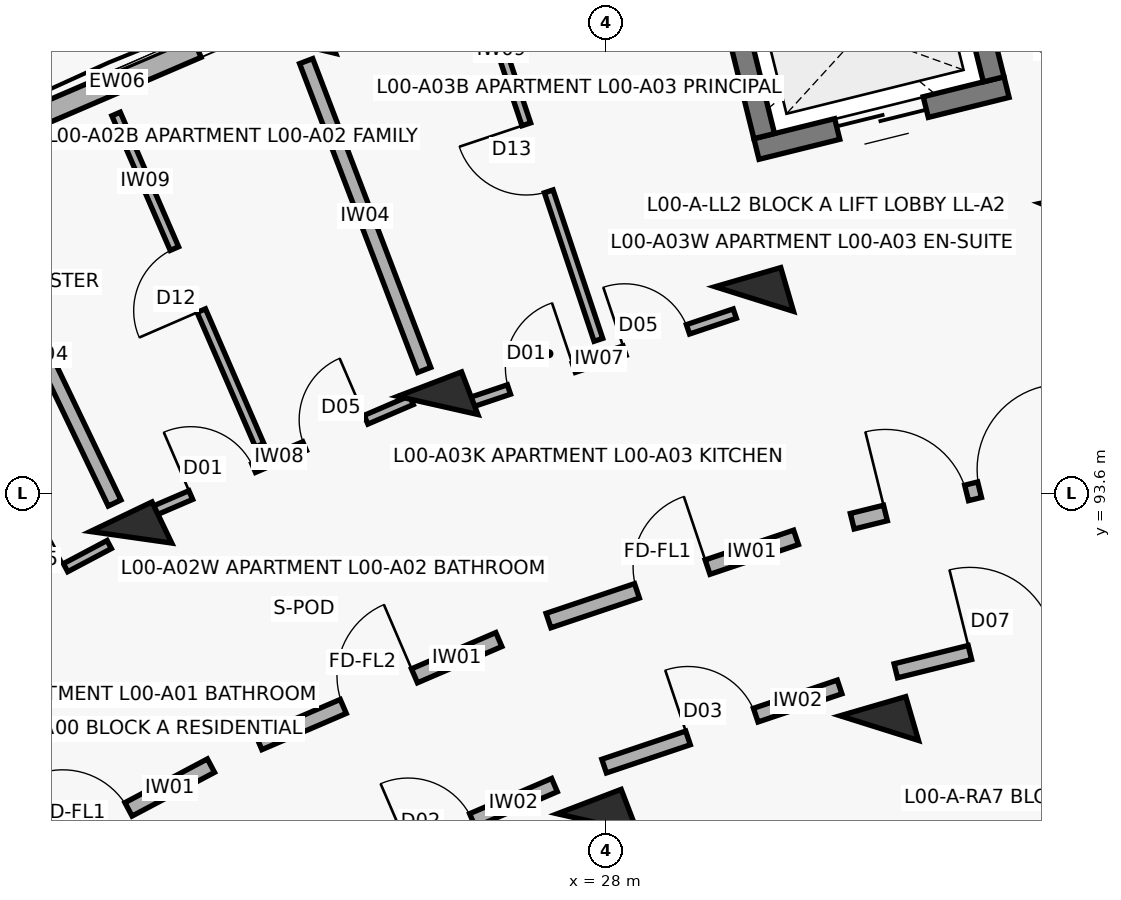
"""IFC4 building model, lengths in metres.
Left out: names, types, materials, properties, quantities, classifications, styles, units other than length and angle.
Written with IfcOpenShell. Run it as: python <this file> out.ifc"""

import sys

from ifc_helpers import new_model, si_unit, direction, frame, frame_2d, origin, origin_2d, place, context, subcontext, project, spatial, rectangle, extrude, element, fill, save


model = new_model("IFC4")
c1 = context("Model", 3, precision=1e-05, world=origin(), true_north=direction((0.0, 1.0)))
c2 = subcontext(c1, "Body", "Model", "MODEL_VIEW")
j1 = project(units=[si_unit("LENGTHUNIT", "METRE"), si_unit("PLANEANGLEUNIT", "RADIAN")], contexts=[c1])
p1 = place(None, origin())
s1 = spatial("IfcSite", under=j1, at=p1, CompositionType="ELEMENT")
p2 = place(p1, origin())
s2 = spatial("IfcBuilding", under=s1, at=p2, CompositionType="ELEMENT")
p3 = place(p2, origin())
s3 = spatial("IfcBuildingStorey", under=s2, at=p3, CompositionType="ELEMENT", Elevation=0.0)
for number, where, z_axis, x_axis in (
    (1, (21.754, 93.019, 0.0), (0.0, 0.0, 1.0), (-0.432, 0.902, 0.0)),
    (2, (27.889, 89.261, 0.0), (0.0, 0.0, 1.0), (-0.357, 0.934, 0.0)),
    (3, (25.79, 94.753, 0.0), (0.0, 0.0, 1.0), (-0.357, 0.934, 0.0)),
):
    element("IfcColumn", number, at=place(p3, frame(where, z_axis=z_axis, x_axis=x_axis)), inside=s3, PredefinedType="COLUMN", context=c2, shape_type="SweptSolid", body=[
        extrude(rectangle(XDim=0.6, YDim=0.9, at=origin_2d()), origin(), (0.0, 0.0, 1.0), 4.5),
    ])
p4 = place(p3, frame((23.976, 99.499, 0.0), z_axis=(0.0, 0.0, 1.0), x_axis=(-0.357064076459, 0.934079892355, 0.0)))
e4 = element("IfcColumn", 4, at=p4, inside=s3, PredefinedType="COLUMN", context=c2, shape_type="SweptSolid", body=[
    extrude(rectangle(XDim=0.55, YDim=0.8, at=origin_2d()), origin(), (0.0, 0.0, 1.0), 4.5),
])
for number, where, z_axis, x_axis in (
    (5, (31.599, 90.508, 0.0), (0.0, 0.0, 1.0), (-0.28, 0.96, 0.0)),
    (6, (29.954, 96.153, 0.0), (0.0, 0.0, 1.0), (-0.28, 0.96, 0.0)),
    (7, (34.219, 97.209, 0.0), (0.0, 0.0, 1.0), (-0.2, 0.98, 0.0)),
):
    element("IfcColumn", number, at=place(p3, frame(where, z_axis=z_axis, x_axis=x_axis)), inside=s3, PredefinedType="COLUMN", context=c2, shape_type="SweptSolid", body=[
        extrude(rectangle(XDim=0.6, YDim=0.9, at=origin_2d()), origin(), (0.0, 0.0, 1.0), 4.5),
    ])
p5 = place(p3, frame((19.361, 98.059, 0.0), z_axis=(0.0, 0.0, 1.0), x_axis=(0.918711189033, 0.394930058548, 0.0)))
e8 = element("IfcWall", 8, at=p5, inside=s3, PredefinedType="SOLIDWALL", context=c2, shape_type="SweptSolid", body=[
    extrude(rectangle(XDim=4.809, YDim=0.275, at=frame_2d((2.404, 0.0))), origin(), (0.0, 0.0, 1.0), 3.45),
])
p6 = place(p5, frame((0.3, 0.0, 0.3)))
e9 = element("IfcOpeningElement", 9, at=p6, cuts=e8, PredefinedType="OPENING", context=c2, shape_type="SweptSolid", body=[
    extrude(rectangle(XDim=0.96, YDim=1.28, at=frame_2d((0.48, 0.64))), frame((0.0, 0.147, 0.0), z_axis=(0.0, -1.0, 0.0), x_axis=(1.0, 0.0, 0.0)), (0.0, 0.0, 1.0), 0.295),
])
p7 = place(p5, frame((3.549, 0.0, 0.3)))
e10 = element("IfcOpeningElement", 10, at=p7, cuts=e8, PredefinedType="OPENING", context=c2, shape_type="SweptSolid", body=[
    extrude(rectangle(XDim=0.96, YDim=1.28, at=frame_2d((0.48, 0.64))), frame((0.0, 0.147, 0.0), z_axis=(0.0, -1.0, 0.0), x_axis=(1.0, 0.0, 0.0)), (0.0, 0.0, 1.0), 0.295),
])
p8 = place(p3, frame((35.098, 94.363, 0.0), z_axis=(0.0, 0.0, 1.0), x_axis=(-0.160227496777, 0.987080112897, 0.0)))
e11 = element("IfcWall", 11, at=p8, inside=s3, PredefinedType="SHEAR", context=c2, shape_type="SweptSolid", body=[
    extrude(rectangle(XDim=7.69, YDim=0.3, at=frame_2d((3.845, 0.0))), origin(), (0.0, 0.0, 1.0), 4.5),
])
p9 = place(p3, frame((33.273, 98.942, 0.0), z_axis=(0.0, 0.0, 1.0), x_axis=(-0.970707542441, -0.240264160972, 0.0)))
e12 = element("IfcWall", 12, at=p9, inside=s3, PredefinedType="SHEAR", context=c2, shape_type="SweptSolid", body=[
    extrude(rectangle(XDim=3.39, YDim=0.28, at=frame_2d((1.695, 0.0))), origin(), (0.0, 0.0, 1.0), 4.5),
])
p10 = place(p9, frame((1.095, 0.0, 0.0)))
e13 = element("IfcOpeningElement", 13, at=p10, cuts=e12, PredefinedType="OPENING", context=c2, shape_type="SweptSolid", body=[
    extrude(rectangle(XDim=1.2, YDim=2.15, at=frame_2d((0.6, 1.075))), frame((0.0, 0.15, 0.0), z_axis=(0.0, -1.0, 0.0), x_axis=(1.0, 0.0, 0.0)), (0.0, 0.0, 1.0), 0.3),
])
p11 = place(p3, frame((33.104, 99.044, 0.0), z_axis=(0.0, 0.0, 1.0), x_axis=(-0.240186044774, 0.970726873995, 0.0)))
e14 = element("IfcWall", 14, at=p11, inside=s3, PredefinedType="SHEAR", context=c2, shape_type="SweptSolid", body=[
    extrude(rectangle(XDim=2.03, YDim=0.28, at=frame_2d((1.015, 0.0))), origin(), (0.0, 0.0, 1.0), 4.5),
])
p12 = place(p3, frame((30.085, 98.297, 0.0), z_axis=(0.0, 0.0, 1.0), x_axis=(-0.2402993748, 0.970698825832, 0.0)))
e15 = element("IfcWall", 15, at=p12, inside=s3, PredefinedType="SHEAR", context=c2, shape_type="SweptSolid", body=[
    extrude(rectangle(XDim=2.03, YDim=0.28, at=frame_2d((1.015, 0.0))), origin(), (0.0, 0.0, 1.0), 4.5),
])
p13 = place(p3, frame((19.77, 88.404, 0.0), z_axis=(0.0, 0.0, 1.0), x_axis=(0.883410853063, 0.468599258099, 0.0)))
e16 = element("IfcWall", 16, at=p13, inside=s3, PredefinedType="SOLIDWALL", context=c2, shape_type="SweptSolid", body=[
    extrude(rectangle(XDim=3.436, YDim=0.2, at=frame_2d((1.718, 0.0))), origin(), (0.0, 0.0, 1.0), 3.34),
])
p14 = place(p13, frame((1.228, 0.0, 0.0)))
e17 = element("IfcOpeningElement", 17, at=p14, cuts=e16, PredefinedType="OPENING", context=c2, shape_type="SweptSolid", body=[
    extrude(rectangle(XDim=0.98, YDim=2.15, at=frame_2d((0.49, 1.075))), frame((0.0, 0.11, 0.0), z_axis=(0.0, -1.0, 0.0), x_axis=(1.0, 0.0, 0.0)), (0.0, 0.0, 1.0), 0.22),
])
p15 = place(p3, frame((18.113, 91.144, 0.0), z_axis=(0.0, 0.0, 1.0), x_axis=(0.88341855112, 0.46858474531, 0.0)))
e18 = element("IfcWall", 18, at=p15, inside=s3, PredefinedType="PARTITIONING", context=c2, shape_type="SweptSolid", body=[
    extrude(rectangle(XDim=3.797, YDim=0.12, at=frame_2d((1.898, 0.0))), origin(), (0.0, 0.0, 1.0), 3.34),
])
p16 = place(p15, frame((0.65, 0.0, 0.0)))
e19 = element("IfcOpeningElement", 19, at=p16, cuts=e18, PredefinedType="OPENING", context=c2, shape_type="SweptSolid", body=[
    extrude(rectangle(XDim=0.9, YDim=2.1, at=frame_2d((0.45, 1.05))), frame((0.0, 0.07, 0.0), z_axis=(0.0, -1.0, 0.0), x_axis=(1.0, 0.0, 0.0)), (0.0, 0.0, 1.0), 0.14),
])
p17 = place(p15, frame((2.267, 0.0, 0.0)))
e20 = element("IfcOpeningElement", 20, at=p17, cuts=e18, PredefinedType="OPENING", context=c2, shape_type="SweptSolid", body=[
    extrude(rectangle(XDim=0.88, YDim=2.1, at=frame_2d((0.44, 1.05))), frame((0.0, 0.07, 0.0), z_axis=(0.0, -1.0, 0.0), x_axis=(1.0, 0.0, 0.0)), (0.0, 0.0, 1.0), 0.14),
])
p18 = place(p3, frame((23.437, 90.316, 0.0), z_axis=(0.0, 0.0, 1.0), x_axis=(0.918718172399, 0.394913813008, 0.0)))
e21 = element("IfcWall", 21, at=p18, inside=s3, PredefinedType="SOLIDWALL", context=c2, shape_type="SweptSolid", body=[
    extrude(rectangle(XDim=3.436, YDim=0.2, at=frame_2d((1.718, 0.0))), origin(), (0.0, 0.0, 1.0), 3.34),
])
p19 = place(p18, frame((1.208, 0.0, 0.0)))
e22 = element("IfcOpeningElement", 22, at=p19, cuts=e21, PredefinedType="OPENING", context=c2, shape_type="SweptSolid", body=[
    extrude(rectangle(XDim=1.02, YDim=2.15, at=frame_2d((0.51, 1.075))), frame((0.0, 0.11, 0.0), z_axis=(0.0, -1.0, 0.0), x_axis=(1.0, 0.0, 0.0)), (0.0, 0.0, 1.0), 0.22),
])
p20 = place(p3, frame((24.322, 88.467, 0.0), z_axis=(0.0, 0.0, 1.0), x_axis=(0.918723391052, 0.394901672235, 0.0)))
e23 = element("IfcWall", 23, at=p20, inside=s3, PredefinedType="SOLIDWALL", context=c2, shape_type="SweptSolid", body=[
    extrude(rectangle(XDim=3.269, YDim=0.19, at=frame_2d((1.634, 0.0))), origin(), (0.0, 0.0, 1.0), 3.34),
])
p21 = place(p20, frame((1.174, 0.0, 0.0)))
e24 = element("IfcOpeningElement", 24, at=p21, cuts=e23, PredefinedType="OPENING", context=c2, shape_type="SweptSolid", body=[
    extrude(rectangle(XDim=0.92, YDim=2.1, at=frame_2d((0.46, 1.05))), frame((0.0, 0.105, 0.0), z_axis=(0.0, -1.0, 0.0), x_axis=(1.0, 0.0, 0.0)), (0.0, 0.0, 1.0), 0.21),
])
p22 = place(p3, frame((21.943, 93.317, 0.0), z_axis=(0.0, 0.0, 1.0), x_axis=(0.918726854017, 0.394893615684, 0.0)))
e25 = element("IfcWall", 25, at=p22, inside=s3, PredefinedType="PARTITIONING", context=c2, shape_type="SweptSolid", body=[
    extrude(rectangle(XDim=3.81, YDim=0.125, at=frame_2d((1.905, 0.0))), origin(), (0.0, 0.0, 1.0), 3.34),
])
p23 = place(p22, frame((0.65, 0.0, 0.0)))
e26 = element("IfcOpeningElement", 26, at=p23, cuts=e25, PredefinedType="OPENING", context=c2, shape_type="SweptSolid", body=[
    extrude(rectangle(XDim=0.9, YDim=2.1, at=frame_2d((0.45, 1.05))), frame((0.0, 0.073, 0.0), z_axis=(0.0, -1.0, 0.0), x_axis=(1.0, 0.0, 0.0)), (0.0, 0.0, 1.0), 0.145),
])
p24 = place(p22, frame((2.28, 0.0, 0.0)))
e27 = element("IfcOpeningElement", 27, at=p24, cuts=e25, PredefinedType="OPENING", context=c2, shape_type="SweptSolid", body=[
    extrude(rectangle(XDim=0.88, YDim=2.1, at=frame_2d((0.44, 1.05))), frame((0.0, 0.073, 0.0), z_axis=(0.0, -1.0, 0.0), x_axis=(1.0, 0.0, 0.0)), (0.0, 0.0, 1.0), 0.145),
])
p25 = place(p3, frame((23.446, 94.23, 0.0), z_axis=(0.0, 0.0, 1.0), x_axis=(-0.3976752315, 0.917526244993, 0.0)))
e28 = element("IfcWall", 28, at=p25, inside=s3, PredefinedType="PARTITIONING", context=c2, shape_type="SweptSolid", body=[
    extrude(rectangle(XDim=4.75, YDim=0.12, at=frame_2d((2.375, 0.0))), origin(), (0.0, 0.0, 1.0), 3.34),
])
p26 = place(p25, frame((1.93, 0.0, 0.0)))
e29 = element("IfcOpeningElement", 29, at=p26, cuts=e28, PredefinedType="OPENING", context=c2, shape_type="SweptSolid", body=[
    extrude(rectangle(XDim=0.89, YDim=2.1, at=frame_2d((0.445, 1.05))), frame((0.0, 0.07, 0.0), z_axis=(0.0, -1.0, 0.0), x_axis=(1.0, 0.0, 0.0)), (0.0, 0.0, 1.0), 0.14),
])
p27 = place(p3, frame((21.538, 93.469, 0.0), z_axis=(0.0, 0.0, 1.0), x_axis=(-0.432086898897, 0.901831975371, 0.0)))
e30 = element("IfcWall", 30, at=p27, inside=s3, PredefinedType="SOLIDWALL", context=c2, shape_type="SweptSolid", body=[
    extrude(rectangle(XDim=4.35, YDim=0.185, at=frame_2d((2.175, 0.0))), origin(), (0.0, 0.0, 1.0), 3.34),
])
p28 = place(p3, frame((27.247, 91.923, 0.0), z_axis=(0.0, 0.0, 1.0), x_axis=(0.947863007629, 0.318678080151, 0.0)))
e31 = element("IfcWall", 31, at=p28, inside=s3, PredefinedType="SOLIDWALL", context=c2, shape_type="SweptSolid", body=[
    extrude(rectangle(XDim=3.436, YDim=0.2, at=frame_2d((1.718, 0.0))), origin(), (0.0, 0.0, 1.0), 3.34),
])
p29 = place(p28, frame((1.228, 0.0, 0.0)))
e32 = element("IfcOpeningElement", 32, at=p29, cuts=e31, PredefinedType="OPENING", context=c2, shape_type="SweptSolid", body=[
    extrude(rectangle(XDim=0.98, YDim=2.15, at=frame_2d((0.49, 1.075))), frame((0.0, 0.11, 0.0), z_axis=(0.0, -1.0, 0.0), x_axis=(1.0, 0.0, 0.0)), (0.0, 0.0, 1.0), 0.22),
])
p30 = place(p3, frame((27.979, 90.008, 0.0), z_axis=(0.0, 0.0, 1.0), x_axis=(0.94787351033, 0.318646839643, 0.0)))
e33 = element("IfcWall", 33, at=p30, inside=s3, PredefinedType="SOLIDWALL", context=c2, shape_type="SweptSolid", body=[
    extrude(rectangle(XDim=3.269, YDim=0.19, at=frame_2d((1.634, 0.0))), origin(), (0.0, 0.0, 1.0), 3.34),
])
p31 = place(p30, frame((1.164, 0.0, 0.0)))
e34 = element("IfcOpeningElement", 34, at=p31, cuts=e33, PredefinedType="OPENING", context=c2, shape_type="SweptSolid", body=[
    extrude(rectangle(XDim=0.94, YDim=2.1, at=frame_2d((0.47, 1.05))), frame((0.0, 0.105, 0.0), z_axis=(0.0, -1.0, 0.0), x_axis=(1.0, 0.0, 0.0)), (0.0, 0.0, 1.0), 0.21),
])
p32 = place(p3, frame((26.11, 94.756, 0.0), z_axis=(0.0, 0.0, 1.0), x_axis=(0.947873924847, 0.318645606584, 0.0)))
e35 = element("IfcWall", 35, at=p32, inside=s3, PredefinedType="PARTITIONING", context=c2, shape_type="SweptSolid", body=[
    extrude(rectangle(XDim=3.785, YDim=0.13, at=frame_2d((1.893, 0.0))), origin(), (0.0, 0.0, 1.0), 3.34),
])
p33 = place(p32, frame((0.65, 0.0, 0.0)))
e36 = element("IfcOpeningElement", 36, at=p33, cuts=e35, PredefinedType="OPENING", context=c2, shape_type="SweptSolid", body=[
    extrude(rectangle(XDim=0.9, YDim=2.1, at=frame_2d((0.45, 1.05))), frame((0.0, 0.075, 0.0), z_axis=(0.0, -1.0, 0.0), x_axis=(1.0, 0.0, 0.0)), (0.0, 0.0, 1.0), 0.15),
])
p34 = place(p32, frame((2.255, 0.0, 0.0)))
e37 = element("IfcOpeningElement", 37, at=p34, cuts=e35, PredefinedType="OPENING", context=c2, shape_type="SweptSolid", body=[
    extrude(rectangle(XDim=0.88, YDim=2.1, at=frame_2d((0.44, 1.05))), frame((0.0, 0.075, 0.0), z_axis=(0.0, -1.0, 0.0), x_axis=(1.0, 0.0, 0.0)), (0.0, 0.0, 1.0), 0.15),
])
p35 = place(p3, frame((27.903, 95.616, 0.0), z_axis=(0.0, 0.0, 1.0), x_axis=(-0.31722829501, 0.948349201953, 0.0)))
e38 = element("IfcWall", 38, at=p35, inside=s3, PredefinedType="PARTITIONING", context=c2, shape_type="SweptSolid", body=[
    extrude(rectangle(XDim=5.05, YDim=0.12, at=frame_2d((2.525, 0.0))), origin(), (0.0, 0.0, 1.0), 3.34),
])
p36 = place(p35, frame((2.06, 0.0, 0.0)))
e39 = element("IfcOpeningElement", 39, at=p36, cuts=e38, PredefinedType="OPENING", context=c2, shape_type="SweptSolid", body=[
    extrude(rectangle(XDim=0.93, YDim=2.1, at=frame_2d((0.465, 1.05))), frame((0.0, 0.07, 0.0), z_axis=(0.0, -1.0, 0.0), x_axis=(1.0, 0.0, 0.0)), (0.0, 0.0, 1.0), 0.14),
])
p37 = place(p3, frame((25.611, 95.22, 0.0), z_axis=(0.0, 0.0, 1.0), x_axis=(-0.357064016205, 0.934079915388, 0.0)))
e40 = element("IfcWall", 40, at=p37, inside=s3, PredefinedType="SOLIDWALL", context=c2, shape_type="SweptSolid", body=[
    extrude(rectangle(XDim=4.35, YDim=0.185, at=frame_2d((2.175, 0.0))), origin(), (0.0, 0.0, 1.0), 3.34),
])
p38 = place(p3, frame((31.243, 93.23, 0.0), z_axis=(0.0, 0.0, 1.0), x_axis=(0.970719238682, 0.240216901263, 0.0)))
e41 = element("IfcWall", 41, at=p38, inside=s3, PredefinedType="SOLIDWALL", context=c2, shape_type="SweptSolid", body=[
    extrude(rectangle(XDim=3.296, YDim=0.21, at=frame_2d((1.648, 0.0))), origin(), (0.0, 0.0, 1.0), 3.34),
])
p39 = place(p38, frame((0.45, 0.0, 0.0)))
e42 = element("IfcOpeningElement", 42, at=p39, cuts=e41, PredefinedType="OPENING", context=c2, shape_type="SweptSolid", body=[
    extrude(rectangle(XDim=1.1, YDim=2.15, at=frame_2d((0.55, 1.075))), frame((0.0, 0.115, 0.0), z_axis=(0.0, -1.0, 0.0), x_axis=(1.0, 0.0, 0.0)), (0.0, 0.0, 1.0), 0.23),
])
p40 = place(p38, frame((1.726, 0.0, 0.0)))
e43 = element("IfcOpeningElement", 43, at=p40, cuts=e41, PredefinedType="OPENING", context=c2, shape_type="SweptSolid", body=[
    extrude(rectangle(XDim=1.12, YDim=2.15, at=frame_2d((0.56, 1.075))), frame((0.0, 0.115, 0.0), z_axis=(0.0, -1.0, 0.0), x_axis=(1.0, 0.0, 0.0)), (0.0, 0.0, 1.0), 0.23),
])
p41 = place(p3, frame((31.816, 91.262, 0.0), z_axis=(0.0, 0.0, 1.0), x_axis=(0.970727194092, 0.240184751078, 0.0)))
e44 = element("IfcWall", 44, at=p41, inside=s3, PredefinedType="SOLIDWALL", context=c2, shape_type="SweptSolid", body=[
    extrude(rectangle(XDim=3.129, YDim=0.19, at=frame_2d((1.564, 0.0))), origin(), (0.0, 0.0, 1.0), 3.34),
])
p42 = place(p41, frame((1.004, 0.0, 0.0)))
e45 = element("IfcOpeningElement", 45, at=p42, cuts=e44, PredefinedType="OPENING", context=c2, shape_type="SweptSolid", body=[
    extrude(rectangle(XDim=1.12, YDim=2.15, at=frame_2d((0.56, 1.075))), frame((0.0, 0.105, 0.0), z_axis=(0.0, -1.0, 0.0), x_axis=(1.0, 0.0, 0.0)), (0.0, 0.0, 1.0), 0.21),
])
p43 = place(p10, origin())
e46 = element("IfcDoor", 46, at=p43, inside=s3, OperationType="DOUBLE_DOOR_SLIDING", PredefinedType="DOOR", context=c2, shape_type="SweptSolid", body=[
    extrude(rectangle(XDim=1.2, YDim=2.15, at=frame_2d((0.6, 1.075))), frame((0.0, 0.025, 0.0), z_axis=(0.0, -1.0, 0.0), x_axis=(1.0, 0.0, 0.0)), (0.0, 0.0, 1.0), 0.05),
])
fill(e13, e46)
p44 = place(p14, origin())
e47 = element("IfcDoor", 47, at=p44, inside=s3, OperationType="SINGLE_SWING_LEFT", PredefinedType="DOOR", context=c2, shape_type="SweptSolid", body=[
    extrude(rectangle(XDim=0.98, YDim=2.15, at=frame_2d((0.49, 1.075))), frame((0.0, 0.025, 0.0), z_axis=(0.0, -1.0, 0.0), x_axis=(1.0, 0.0, 0.0)), (0.0, 0.0, 1.0), 0.05),
])
fill(e17, e47)
p45 = place(p17, origin())
e48 = element("IfcDoor", 48, at=p45, inside=s3, OperationType="SINGLE_SWING_RIGHT", PredefinedType="DOOR", context=c2, shape_type="SweptSolid", body=[
    extrude(rectangle(XDim=0.88, YDim=2.1, at=frame_2d((0.44, 1.05))), frame((0.0, 0.025, 0.0), z_axis=(0.0, -1.0, 0.0), x_axis=(1.0, 0.0, 0.0)), (0.0, 0.0, 1.0), 0.05),
])
fill(e20, e48)
p46 = place(p19, origin())
e49 = element("IfcDoor", 49, at=p46, inside=s3, OperationType="SINGLE_SWING_RIGHT", PredefinedType="DOOR", context=c2, shape_type="SweptSolid", body=[
    extrude(rectangle(XDim=1.02, YDim=2.15, at=frame_2d((0.51, 1.075))), frame((0.0, 0.025, 0.0), z_axis=(0.0, -1.0, 0.0), x_axis=(1.0, 0.0, 0.0)), (0.0, 0.0, 1.0), 0.05),
])
fill(e22, e49)
p47 = place(p21, origin())
e50 = element("IfcDoor", 50, at=p47, inside=s3, OperationType="SINGLE_SWING_LEFT", PredefinedType="DOOR", context=c2, shape_type="SweptSolid", body=[
    extrude(rectangle(XDim=0.92, YDim=2.1, at=frame_2d((0.46, 1.05))), frame((0.0, 0.025, 0.0), z_axis=(0.0, -1.0, 0.0), x_axis=(1.0, 0.0, 0.0)), (0.0, 0.0, 1.0), 0.05),
])
fill(e24, e50)
p48 = place(p23, origin())
e51 = element("IfcDoor", 51, at=p48, inside=s3, OperationType="SINGLE_SWING_LEFT", PredefinedType="DOOR", context=c2, shape_type="SweptSolid", body=[
    extrude(rectangle(XDim=0.9, YDim=2.1, at=frame_2d((0.45, 1.05))), frame((0.0, 0.025, 0.0), z_axis=(0.0, -1.0, 0.0), x_axis=(1.0, 0.0, 0.0)), (0.0, 0.0, 1.0), 0.05),
])
fill(e26, e51)
p49 = place(p24, origin())
e52 = element("IfcDoor", 52, at=p49, inside=s3, OperationType="SINGLE_SWING_RIGHT", PredefinedType="DOOR", context=c2, shape_type="SweptSolid", body=[
    extrude(rectangle(XDim=0.88, YDim=2.1, at=frame_2d((0.44, 1.05))), frame((0.0, 0.025, 0.0), z_axis=(0.0, -1.0, 0.0), x_axis=(1.0, 0.0, 0.0)), (0.0, 0.0, 1.0), 0.05),
])
fill(e27, e52)
p50 = place(p26, origin())
e53 = element("IfcDoor", 53, at=p50, inside=s3, OperationType="SINGLE_SWING_LEFT", PredefinedType="DOOR", context=c2, shape_type="SweptSolid", body=[
    extrude(rectangle(XDim=0.89, YDim=2.1, at=frame_2d((0.445, 1.05))), frame((0.0, 0.025, 0.0), z_axis=(0.0, -1.0, 0.0), x_axis=(1.0, 0.0, 0.0)), (0.0, 0.0, 1.0), 0.05),
])
fill(e29, e53)
p51 = place(p29, origin())
e54 = element("IfcDoor", 54, at=p51, inside=s3, OperationType="SINGLE_SWING_RIGHT", PredefinedType="DOOR", context=c2, shape_type="SweptSolid", body=[
    extrude(rectangle(XDim=0.98, YDim=2.15, at=frame_2d((0.49, 1.075))), frame((0.0, 0.025, 0.0), z_axis=(0.0, -1.0, 0.0), x_axis=(1.0, 0.0, 0.0)), (0.0, 0.0, 1.0), 0.05),
])
fill(e32, e54)
p52 = place(p31, origin())
e55 = element("IfcDoor", 55, at=p52, inside=s3, OperationType="SINGLE_SWING_LEFT", PredefinedType="DOOR", context=c2, shape_type="SweptSolid", body=[
    extrude(rectangle(XDim=0.94, YDim=2.1, at=frame_2d((0.47, 1.05))), frame((0.0, 0.025, 0.0), z_axis=(0.0, -1.0, 0.0), x_axis=(1.0, 0.0, 0.0)), (0.0, 0.0, 1.0), 0.05),
])
fill(e34, e55)
p53 = place(p33, origin())
e56 = element("IfcDoor", 56, at=p53, inside=s3, OperationType="SINGLE_SWING_RIGHT", PredefinedType="DOOR", context=c2, shape_type="SweptSolid", body=[
    extrude(rectangle(XDim=0.9, YDim=2.1, at=frame_2d((0.45, 1.05))), frame((0.0, 0.025, 0.0), z_axis=(0.0, -1.0, 0.0), x_axis=(1.0, 0.0, 0.0)), (0.0, 0.0, 1.0), 0.05),
])
fill(e36, e56)
p54 = place(p34, origin())
e57 = element("IfcDoor", 57, at=p54, inside=s3, OperationType="SINGLE_SWING_LEFT", PredefinedType="DOOR", context=c2, shape_type="SweptSolid", body=[
    extrude(rectangle(XDim=0.88, YDim=2.1, at=frame_2d((0.44, 1.05))), frame((0.0, 0.025, 0.0), z_axis=(0.0, -1.0, 0.0), x_axis=(1.0, 0.0, 0.0)), (0.0, 0.0, 1.0), 0.05),
])
fill(e37, e57)
p55 = place(p36, origin())
e58 = element("IfcDoor", 58, at=p55, inside=s3, OperationType="SINGLE_SWING_RIGHT", PredefinedType="DOOR", context=c2, shape_type="SweptSolid", body=[
    extrude(rectangle(XDim=0.93, YDim=2.1, at=frame_2d((0.465, 1.05))), frame((0.0, 0.025, 0.0), z_axis=(0.0, -1.0, 0.0), x_axis=(1.0, 0.0, 0.0)), (0.0, 0.0, 1.0), 0.05),
])
fill(e39, e58)
p56 = place(p39, origin())
e59 = element("IfcDoor", 59, at=p56, inside=s3, OperationType="SINGLE_SWING_LEFT", PredefinedType="DOOR", context=c2, shape_type="SweptSolid", body=[
    extrude(rectangle(XDim=1.1, YDim=2.15, at=frame_2d((0.55, 1.075))), frame((0.0, 0.025, 0.0), z_axis=(0.0, -1.0, 0.0), x_axis=(1.0, 0.0, 0.0)), (0.0, 0.0, 1.0), 0.05),
])
fill(e42, e59)
p57 = place(p40, origin())
e60 = element("IfcDoor", 60, at=p57, inside=s3, OperationType="SINGLE_SWING_RIGHT", PredefinedType="DOOR", context=c2, shape_type="SweptSolid", body=[
    extrude(rectangle(XDim=1.12, YDim=2.15, at=frame_2d((0.56, 1.075))), frame((0.0, 0.025, 0.0), z_axis=(0.0, -1.0, 0.0), x_axis=(1.0, 0.0, 0.0)), (0.0, 0.0, 1.0), 0.05),
])
fill(e43, e60)
p58 = place(p42, origin())
e61 = element("IfcDoor", 61, at=p58, inside=s3, OperationType="SINGLE_SWING_LEFT", PredefinedType="DOOR", context=c2, shape_type="SweptSolid", body=[
    extrude(rectangle(XDim=1.12, YDim=2.15, at=frame_2d((0.56, 1.075))), frame((0.0, 0.025, 0.0), z_axis=(0.0, -1.0, 0.0), x_axis=(1.0, 0.0, 0.0)), (0.0, 0.0, 1.0), 0.05),
])
fill(e45, e61)
save(model, sys.argv[1])
